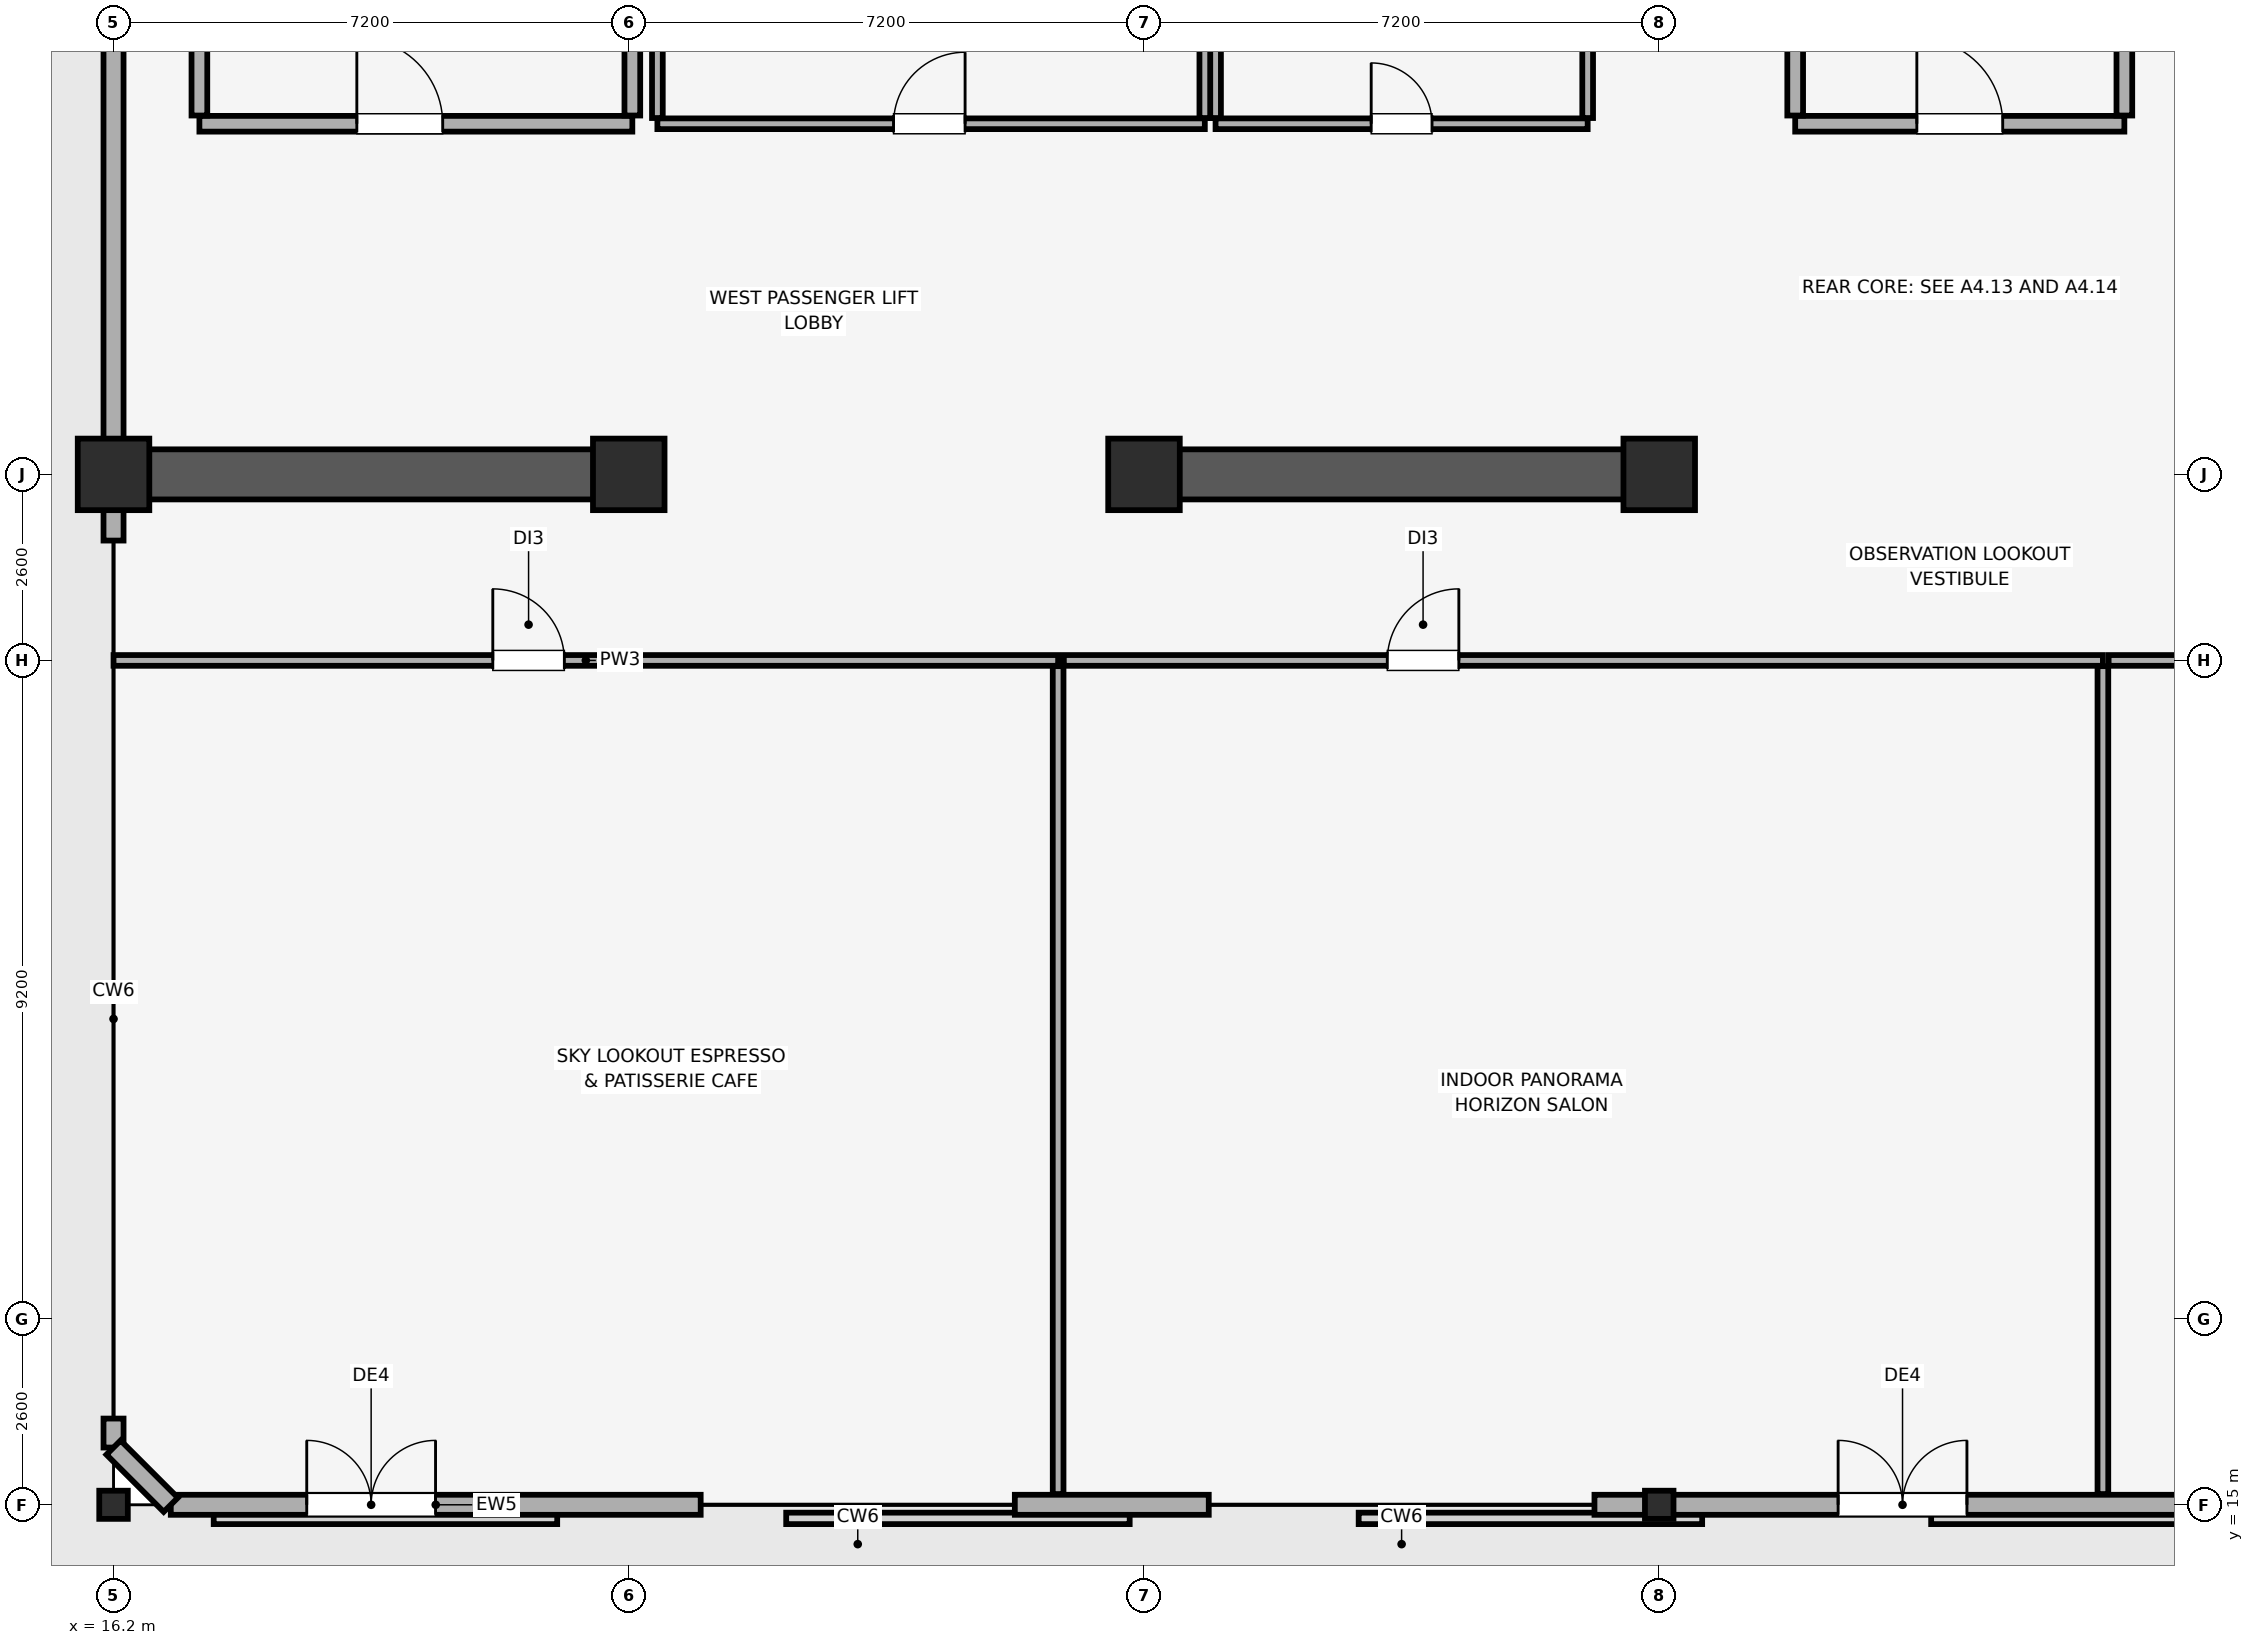
"""IFC4 building model, lengths in metres.
Left out: names, types, materials, properties, quantities, classifications, styles, units other than length and angle.
Written with IfcOpenShell. Run it as: python <this file> out.ifc"""

import sys

from ifc_helpers import new_model, si_unit, direction, frame, frame_2d, origin, origin_2d, place, context, subcontext, project, spatial, rectangle, i_section, extrude, element, fill, save


model = new_model("IFC4")
c1 = context("Model", 3, precision=1e-05, world=origin(), true_north=direction((0.0, 1.0)))
c2 = subcontext(c1, "Body", "Model", "MODEL_VIEW")
j1 = project(units=[si_unit("LENGTHUNIT", "METRE"), si_unit("PLANEANGLEUNIT", "RADIAN")], contexts=[c1])
p1 = place(None, origin())
s1 = spatial("IfcSite", under=j1, at=p1, CompositionType="ELEMENT")
p2 = place(p1, origin())
s2 = spatial("IfcBuilding", under=s1, at=p2, CompositionType="ELEMENT")
p3 = place(p2, frame((0.0, 0.0, 310.7)))
s3 = spatial("IfcBuildingStorey", under=s2, at=p3, CompositionType="ELEMENT", Elevation=310.7)
for number, where, z_axis, x_axis in (
    (1, (16.2, 29.4, 0.0), (0.0, 0.0, 1.0), (1.0, 0.0, 0.0)),
    (2, (23.4, 29.4, 0.0), (0.0, 0.0, 1.0), (1.0, 0.0, 0.0)),
    (3, (30.6, 29.4, 0.0), (0.0, 0.0, 1.0), (1.0, 0.0, 0.0)),
    (4, (37.8, 29.4, 0.0), (0.0, 0.0, 1.0), (1.0, 0.0, 0.0)),
):
    element("IfcColumn", number, at=place(p3, frame(where, z_axis=z_axis, x_axis=x_axis)), inside=s3, PredefinedType="COLUMN", context=c2, shape_type="SweptSolid", body=[
        extrude(rectangle(XDim=1.0, YDim=1.0, at=origin_2d()), origin(), (0.0, 0.0, 1.0), 7.5),
    ])
for number, where, z_axis, x_axis in (
    (5, (16.2, 15.0, 0.0), (0.0, 0.0, 1.0), (1.0, 0.0, 0.0)),
    (6, (37.8, 15.0, 0.0), (0.0, 0.0, 1.0), (1.0, 0.0, 0.0)),
):
    element("IfcColumn", number, at=place(p3, frame(where, z_axis=z_axis, x_axis=x_axis)), inside=s3, PredefinedType="COLUMN", context=c2, shape_type="SweptSolid", body=[
        extrude(i_section(OverallWidth=0.399, OverallDepth=0.394, WebThickness=0.023, FlangeThickness=0.037, FilletRadius=0.015, at=origin_2d()), origin(), (0.0, 0.0, 1.0), 7.5),
    ])
p4 = place(p3, frame((17.0, 15.0, 0.0), z_axis=(0.0, 0.0, 1.0), x_axis=(1.0, 0.0, 0.0)))
e7 = element("IfcWall", 7, at=p4, inside=s3, PredefinedType="SOLIDWALL", context=c2, shape_type="SweptSolid", body=[
    extrude(rectangle(XDim=7.405, YDim=0.28, at=frame_2d((3.703, 0.0))), origin(), (0.0, 0.0, 1.0), 7.0),
])
p5 = place(p4, frame((1.9, 0.0, 0.0)))
e8 = element("IfcOpeningElement", 8, at=p5, cuts=e7, PredefinedType="OPENING", context=c2, shape_type="SweptSolid", body=[
    extrude(rectangle(XDim=1.8, YDim=2.3, at=frame_2d((0.9, 1.15))), frame((0.0, 0.15, 0.0), z_axis=(0.0, -1.0, 0.0), x_axis=(1.0, 0.0, 0.0)), (0.0, 0.0, 1.0), 0.3),
])
p6 = place(p3, frame((28.795, 15.0, 0.0), z_axis=(0.0, 0.0, 1.0), x_axis=(1.0, 0.0, 0.0)))
e9 = element("IfcWall", 9, at=p6, inside=s3, PredefinedType="SOLIDWALL", context=c2, shape_type="SweptSolid", body=[
    extrude(rectangle(XDim=2.71, YDim=0.28, at=frame_2d((1.355, 0.0))), origin(), (0.0, 0.0, 1.0), 7.0),
])
p7 = place(p3, frame((36.895, 15.0, 0.0), z_axis=(0.0, 0.0, 1.0), x_axis=(1.0, 0.0, 0.0)))
e10 = element("IfcWall", 10, at=p7, inside=s3, PredefinedType="SOLIDWALL", context=c2, shape_type="SweptSolid", body=[
    extrude(rectangle(XDim=10.21, YDim=0.28, at=frame_2d((5.105, 0.0))), origin(), (0.0, 0.0, 1.0), 7.0),
])
p8 = place(p7, frame((3.405, 0.0, 0.0)))
e11 = element("IfcOpeningElement", 11, at=p8, cuts=e10, PredefinedType="OPENING", context=c2, shape_type="SweptSolid", body=[
    extrude(rectangle(XDim=1.8, YDim=2.3, at=frame_2d((0.9, 1.15))), frame((0.0, 0.15, 0.0), z_axis=(0.0, -1.0, 0.0), x_axis=(1.0, 0.0, 0.0)), (0.0, 0.0, 1.0), 0.3),
])
p9 = place(p3, frame((16.2, 48.2, 0.0), z_axis=(0.0, 0.0, 1.0), x_axis=(0.0, -1.0, 0.0)))
e12 = element("IfcWall", 12, at=p9, inside=s3, PredefinedType="SOLIDWALL", context=c2, shape_type="SweptSolid", body=[
    extrude(rectangle(XDim=19.725, YDim=0.28, at=frame_2d((9.862, 0.0))), origin(), (0.0, 0.0, 1.0), 7.2),
])
p10 = place(p3, frame((16.2, 16.205, 0.0), z_axis=(0.0, 0.0, 1.0), x_axis=(0.0, -1.0, 0.0)))
e13 = element("IfcWall", 13, at=p10, inside=s3, PredefinedType="SOLIDWALL", context=c2, shape_type="SweptSolid", body=[
    extrude(rectangle(XDim=0.405, YDim=0.28, at=frame_2d((0.203, 0.0))), origin(), (0.0, 0.0, 1.0), 7.2),
])
p11 = place(p3, frame((16.2, 15.8, 0.0), z_axis=(0.0, 0.0, 1.0), x_axis=(0.707106781187, -0.707106781187, 0.0)))
e14 = element("IfcWall", 14, at=p11, inside=s3, PredefinedType="SOLIDWALL", context=c2, shape_type="SweptSolid", body=[
    extrude(rectangle(XDim=1.131, YDim=0.28, at=frame_2d((0.566, 0.0))), origin(), (0.0, 0.0, 1.0), 7.5),
])
p12 = place(p3, frame((16.345, 29.4, 0.0), z_axis=(0.0, 0.0, 1.0), x_axis=(1.0, 0.0, 0.0)))
e15 = element("IfcWall", 15, at=p12, inside=s3, PredefinedType="SHEAR", context=c2, shape_type="SweptSolid", body=[
    extrude(rectangle(XDim=7.255, YDim=0.7, at=frame_2d((3.627, 0.0))), origin(), (0.0, 0.0, 1.0), 7.5),
])
p13 = place(p3, frame((30.4, 29.4, 0.0), z_axis=(0.0, 0.0, 1.0), x_axis=(1.0, 0.0, 0.0)))
e16 = element("IfcWall", 16, at=p13, inside=s3, PredefinedType="SHEAR", context=c2, shape_type="SweptSolid", body=[
    extrude(rectangle(XDim=7.6, YDim=0.7, at=frame_2d((3.8, 0.0))), origin(), (0.0, 0.0, 1.0), 7.5),
])
p14 = place(p3, frame((17.4, 34.3, 0.0), z_axis=(0.0, 0.0, 1.0), x_axis=(1.0, 0.0, 0.0)))
e17 = element("IfcWall", 17, at=p14, inside=s3, PredefinedType="PARTITIONING", context=c2, shape_type="SweptSolid", body=[
    extrude(rectangle(XDim=6.05, YDim=0.22, at=frame_2d((3.025, 0.0))), origin(), (0.0, 0.0, 1.0), 7.5),
])
p15 = place(p14, frame((2.2, 0.0, 0.0)))
e18 = element("IfcOpeningElement", 18, at=p15, cuts=e17, PredefinedType="OPENING", context=c2, shape_type="SweptSolid", body=[
    extrude(rectangle(XDim=1.2, YDim=2.15, at=frame_2d((0.6, 1.075))), frame((0.0, 0.12, 0.0), z_axis=(0.0, -1.0, 0.0), x_axis=(1.0, 0.0, 0.0)), (0.0, 0.0, 1.0), 0.24),
])
p16 = place(p3, frame((17.4, 34.415, 0.0), z_axis=(0.0, 0.0, 1.0), x_axis=(0.0, 1.0, 0.0)))
e19 = element("IfcWall", 19, at=p16, inside=s3, PredefinedType="PARTITIONING", context=c2, shape_type="SweptSolid", body=[
    extrude(rectangle(XDim=5.43, YDim=0.22, at=frame_2d((2.715, 0.0))), origin(), (0.0, 0.0, 1.0), 7.5),
])
p17 = place(p3, frame((23.45, 34.415, 0.0), z_axis=(0.0, 0.0, 1.0), x_axis=(0.0, 1.0, 0.0)))
e20 = element("IfcWall", 20, at=p17, inside=s3, PredefinedType="PARTITIONING", context=c2, shape_type="SweptSolid", body=[
    extrude(rectangle(XDim=5.64, YDim=0.22, at=frame_2d((2.82, 0.0))), origin(), (0.0, 0.0, 1.0), 7.5),
])
p18 = place(p3, frame((39.7, 34.3, 0.0), z_axis=(0.0, 0.0, 1.0), x_axis=(1.0, 0.0, 0.0)))
e21 = element("IfcWall", 21, at=p18, inside=s3, PredefinedType="PARTITIONING", context=c2, shape_type="SweptSolid", body=[
    extrude(rectangle(XDim=4.6, YDim=0.22, at=frame_2d((2.3, 0.0))), origin(), (0.0, 0.0, 1.0), 7.5),
])
p19 = place(p18, frame((1.7, 0.0, 0.0)))
e22 = element("IfcOpeningElement", 22, at=p19, cuts=e21, PredefinedType="OPENING", context=c2, shape_type="SweptSolid", body=[
    extrude(rectangle(XDim=1.2, YDim=2.15, at=frame_2d((0.6, 1.075))), frame((0.0, 0.12, 0.0), z_axis=(0.0, -1.0, 0.0), x_axis=(1.0, 0.0, 0.0)), (0.0, 0.0, 1.0), 0.24),
])
for number, where, z_axis, x_axis in (
    (23, (39.7, 34.415, 0.0), (0.0, 0.0, 1.0), (0.0, 1.0, 0.0)),
    (24, (44.3, 34.415, 0.0), (0.0, 0.0, 1.0), (0.0, 1.0, 0.0)),
):
    element("IfcWall", number, at=place(p3, frame(where, z_axis=z_axis, x_axis=x_axis)), inside=s3, PredefinedType="PARTITIONING", context=c2, shape_type="SweptSolid", body=[
        extrude(rectangle(XDim=5.785, YDim=0.22, at=frame_2d((2.893, 0.0))), origin(), (0.0, 0.0, 1.0), 7.5),
    ])
p20 = place(p3, frame((31.6, 34.3, 0.0), z_axis=(0.0, 0.0, 1.0), x_axis=(1.0, 0.0, 0.0)))
e25 = element("IfcWall", 25, at=p20, inside=s3, PredefinedType="PARTITIONING", context=c2, shape_type="SweptSolid", body=[
    extrude(rectangle(XDim=5.2, YDim=0.15, at=frame_2d((2.6, 0.0))), origin(), (0.0, 0.0, 1.0), 7.5),
])
p21 = place(p20, frame((2.175, 0.0, 0.0)))
e26 = element("IfcOpeningElement", 26, at=p21, cuts=e25, PredefinedType="OPENING", context=c2, shape_type="SweptSolid", body=[
    extrude(rectangle(XDim=0.85, YDim=2.1, at=frame_2d((0.425, 1.05))), frame((0.0, 0.085, 0.0), z_axis=(0.0, -1.0, 0.0), x_axis=(1.0, 0.0, 0.0)), (0.0, 0.0, 1.0), 0.17),
])
for number, where, z_axis, x_axis in (
    (27, (31.6, 34.38, 0.0), (0.0, 0.0, 1.0), (0.0, 1.0, 0.0)),
    (28, (36.8, 34.38, 0.0), (0.0, 0.0, 1.0), (0.0, 1.0, 0.0)),
):
    element("IfcWall", number, at=place(p3, frame(where, z_axis=z_axis, x_axis=x_axis)), inside=s3, PredefinedType="PARTITIONING", context=c2, shape_type="SweptSolid", body=[
        extrude(rectangle(XDim=4.94, YDim=0.15, at=frame_2d((2.47, 0.0))), origin(), (0.0, 0.0, 1.0), 7.5),
    ])
p22 = place(p3, frame((23.8, 34.3, 0.0), z_axis=(0.0, 0.0, 1.0), x_axis=(1.0, 0.0, 0.0)))
e29 = element("IfcWall", 29, at=p22, inside=s3, PredefinedType="PARTITIONING", context=c2, shape_type="SweptSolid", body=[
    extrude(rectangle(XDim=7.65, YDim=0.15, at=frame_2d((3.825, 0.0))), origin(), (0.0, 0.0, 1.0), 7.5),
])
p23 = place(p22, frame((3.3, 0.0, 0.0)))
e30 = element("IfcOpeningElement", 30, at=p23, cuts=e29, PredefinedType="OPENING", context=c2, shape_type="SweptSolid", body=[
    extrude(rectangle(XDim=1.0, YDim=2.15, at=frame_2d((0.5, 1.075))), frame((0.0, 0.085, 0.0), z_axis=(0.0, -1.0, 0.0), x_axis=(1.0, 0.0, 0.0)), (0.0, 0.0, 1.0), 0.17),
])
for number, where, z_axis, x_axis in (
    (31, (23.8, 34.38, 0.0), (0.0, 0.0, 1.0), (0.0, 1.0, 0.0)),
    (32, (31.45, 34.38, 0.0), (0.0, 0.0, 1.0), (0.0, 1.0, 0.0)),
):
    element("IfcWall", number, at=place(p3, frame(where, z_axis=z_axis, x_axis=x_axis)), inside=s3, PredefinedType="PARTITIONING", context=c2, shape_type="SweptSolid", body=[
        extrude(rectangle(XDim=4.94, YDim=0.15, at=frame_2d((2.47, 0.0))), origin(), (0.0, 0.0, 1.0), 7.5),
    ])
p24 = place(p3, frame((16.2, 26.8, 0.0), z_axis=(0.0, 0.0, 1.0), x_axis=(1.0, 0.0, 0.0)))
e33 = element("IfcWall", 33, at=p24, inside=s3, PredefinedType="PARTITIONING", context=c2, shape_type="SweptSolid", body=[
    extrude(rectangle(XDim=13.2, YDim=0.15, at=frame_2d((6.6, 0.0))), origin(), (0.0, 0.0, 1.0), 7.5),
])
p25 = place(p24, frame((5.3, 0.0, 0.0)))
e34 = element("IfcOpeningElement", 34, at=p25, cuts=e33, PredefinedType="OPENING", context=c2, shape_type="SweptSolid", body=[
    extrude(rectangle(XDim=1.0, YDim=2.15, at=frame_2d((0.5, 1.075))), frame((0.0, 0.085, 0.0), z_axis=(0.0, -1.0, 0.0), x_axis=(1.0, 0.0, 0.0)), (0.0, 0.0, 1.0), 0.17),
])
p26 = place(p3, frame((29.4, 15.15, 0.0), z_axis=(0.0, 0.0, 1.0), x_axis=(0.0, 1.0, 0.0)))
e35 = element("IfcWall", 35, at=p26, inside=s3, PredefinedType="PARTITIONING", context=c2, shape_type="SweptSolid", body=[
    extrude(rectangle(XDim=11.57, YDim=0.15, at=frame_2d((5.785, 0.0))), origin(), (0.0, 0.0, 1.0), 7.5),
])
p27 = place(p3, frame((29.48, 26.8, 0.0), z_axis=(0.0, 0.0, 1.0), x_axis=(1.0, 0.0, 0.0)))
e36 = element("IfcWall", 36, at=p27, inside=s3, PredefinedType="PARTITIONING", context=c2, shape_type="SweptSolid", body=[
    extrude(rectangle(XDim=14.52, YDim=0.15, at=frame_2d((7.26, 0.0))), origin(), (0.0, 0.0, 1.0), 7.5),
])
p28 = place(p27, frame((4.52, 0.0, 0.0)))
e37 = element("IfcOpeningElement", 37, at=p28, cuts=e36, PredefinedType="OPENING", context=c2, shape_type="SweptSolid", body=[
    extrude(rectangle(XDim=1.0, YDim=2.15, at=frame_2d((0.5, 1.075))), frame((0.0, 0.085, 0.0), z_axis=(0.0, -1.0, 0.0), x_axis=(1.0, 0.0, 0.0)), (0.0, 0.0, 1.0), 0.17),
])
p29 = place(p3, frame((44.0, 15.15, 0.0), z_axis=(0.0, 0.0, 1.0), x_axis=(0.0, 1.0, 0.0)))
e38 = element("IfcWall", 38, at=p29, inside=s3, PredefinedType="PARTITIONING", context=c2, shape_type="SweptSolid", body=[
    extrude(rectangle(XDim=11.57, YDim=0.15, at=frame_2d((5.785, 0.0))), origin(), (0.0, 0.0, 1.0), 7.5),
])
p30 = place(p3, frame((44.08, 26.8, 0.0), z_axis=(0.0, 0.0, 1.0), x_axis=(1.0, 0.0, 0.0)))
e39 = element("IfcWall", 39, at=p30, inside=s3, PredefinedType="PARTITIONING", context=c2, shape_type="SweptSolid", body=[
    extrude(rectangle(XDim=12.52, YDim=0.15, at=frame_2d((6.26, 0.0))), origin(), (0.0, 0.0, 1.0), 7.5),
])
p31 = place(p30, frame((5.72, 0.0, 0.0)))
e40 = element("IfcOpeningElement", 40, at=p31, cuts=e39, PredefinedType="OPENING", context=c2, shape_type="SweptSolid", body=[
    extrude(rectangle(XDim=1.0, YDim=2.15, at=frame_2d((0.5, 1.075))), frame((0.0, 0.085, 0.0), z_axis=(0.0, -1.0, 0.0), x_axis=(1.0, 0.0, 0.0)), (0.0, 0.0, 1.0), 0.17),
])
p32 = place(p5, origin())
e41 = element("IfcDoor", 41, at=p32, inside=s3, OperationType="DOUBLE_DOOR_SINGLE_SWING", PredefinedType="DOOR", context=c2, shape_type="SweptSolid", body=[
    extrude(rectangle(XDim=1.8, YDim=2.3, at=frame_2d((0.9, 1.15))), frame((0.0, 0.025, 0.0), z_axis=(0.0, -1.0, 0.0), x_axis=(1.0, 0.0, 0.0)), (0.0, 0.0, 1.0), 0.05),
])
fill(e8, e41)
p33 = place(p8, origin())
e42 = element("IfcDoor", 42, at=p33, inside=s3, OperationType="DOUBLE_DOOR_SINGLE_SWING", PredefinedType="DOOR", context=c2, shape_type="SweptSolid", body=[
    extrude(rectangle(XDim=1.8, YDim=2.3, at=frame_2d((0.9, 1.15))), frame((0.0, 0.025, 0.0), z_axis=(0.0, -1.0, 0.0), x_axis=(1.0, 0.0, 0.0)), (0.0, 0.0, 1.0), 0.05),
])
fill(e11, e42)
p34 = place(p15, origin())
e43 = element("IfcDoor", 43, at=p34, inside=s3, OperationType="SINGLE_SWING_LEFT", PredefinedType="DOOR", context=c2, shape_type="SweptSolid", body=[
    extrude(rectangle(XDim=1.2, YDim=2.15, at=frame_2d((0.6, 1.075))), frame((0.0, 0.025, 0.0), z_axis=(0.0, -1.0, 0.0), x_axis=(1.0, 0.0, 0.0)), (0.0, 0.0, 1.0), 0.05),
])
fill(e18, e43)
p35 = place(p19, origin())
e44 = element("IfcDoor", 44, at=p35, inside=s3, OperationType="SINGLE_SWING_LEFT", PredefinedType="DOOR", context=c2, shape_type="SweptSolid", body=[
    extrude(rectangle(XDim=1.2, YDim=2.15, at=frame_2d((0.6, 1.075))), frame((0.0, 0.025, 0.0), z_axis=(0.0, -1.0, 0.0), x_axis=(1.0, 0.0, 0.0)), (0.0, 0.0, 1.0), 0.05),
])
fill(e22, e44)
p36 = place(p21, origin())
e45 = element("IfcDoor", 45, at=p36, inside=s3, OperationType="SINGLE_SWING_LEFT", PredefinedType="DOOR", context=c2, shape_type="SweptSolid", body=[
    extrude(rectangle(XDim=0.85, YDim=2.1, at=frame_2d((0.425, 1.05))), frame((0.0, 0.025, 0.0), z_axis=(0.0, -1.0, 0.0), x_axis=(1.0, 0.0, 0.0)), (0.0, 0.0, 1.0), 0.05),
])
fill(e26, e45)
p37 = place(p23, origin())
e46 = element("IfcDoor", 46, at=p37, inside=s3, OperationType="SINGLE_SWING_RIGHT", PredefinedType="DOOR", context=c2, shape_type="SweptSolid", body=[
    extrude(rectangle(XDim=1.0, YDim=2.15, at=frame_2d((0.5, 1.075))), frame((0.0, 0.025, 0.0), z_axis=(0.0, -1.0, 0.0), x_axis=(1.0, 0.0, 0.0)), (0.0, 0.0, 1.0), 0.05),
])
fill(e30, e46)
p38 = place(p25, origin())
e47 = element("IfcDoor", 47, at=p38, inside=s3, OperationType="SINGLE_SWING_LEFT", PredefinedType="DOOR", context=c2, shape_type="SweptSolid", body=[
    extrude(rectangle(XDim=1.0, YDim=2.15, at=frame_2d((0.5, 1.075))), frame((0.0, 0.025, 0.0), z_axis=(0.0, -1.0, 0.0), x_axis=(1.0, 0.0, 0.0)), (0.0, 0.0, 1.0), 0.05),
])
fill(e34, e47)
p39 = place(p28, origin())
e48 = element("IfcDoor", 48, at=p39, inside=s3, OperationType="SINGLE_SWING_RIGHT", PredefinedType="DOOR", context=c2, shape_type="SweptSolid", body=[
    extrude(rectangle(XDim=1.0, YDim=2.15, at=frame_2d((0.5, 1.075))), frame((0.0, 0.025, 0.0), z_axis=(0.0, -1.0, 0.0), x_axis=(1.0, 0.0, 0.0)), (0.0, 0.0, 1.0), 0.05),
])
fill(e37, e48)
save(model, sys.argv[1])
